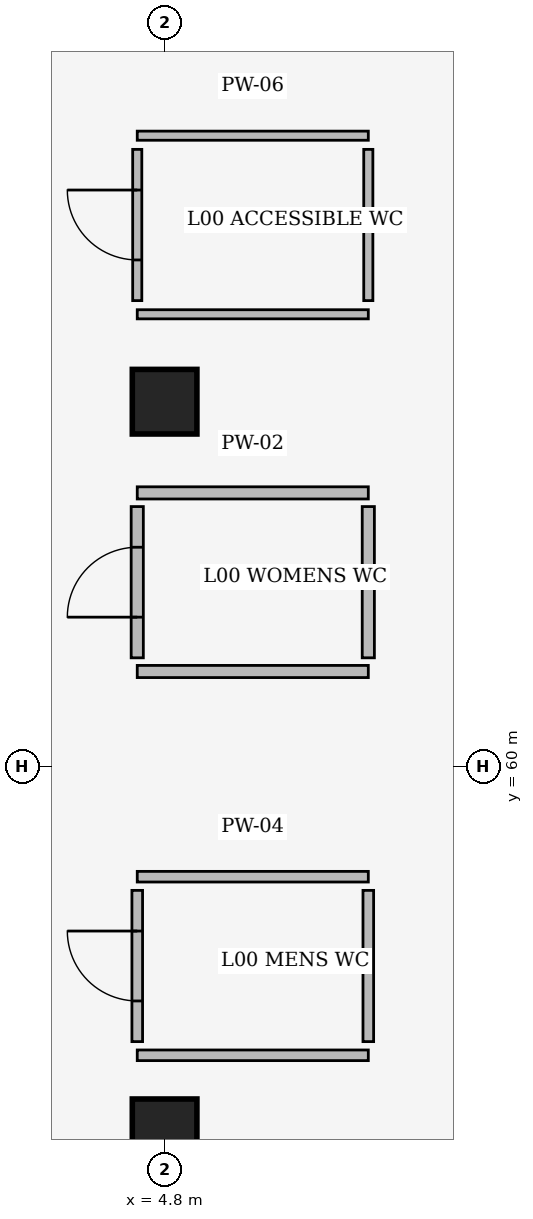
"""IFC4 building model, lengths in metres.
Left out: names, types, materials, properties, quantities, classifications, styles, units other than length and angle.
Written with IfcOpenShell. Run it as: python <this file> out.ifc"""

import sys

from ifc_helpers import new_model, si_unit, direction, frame, frame_2d, origin, origin_2d, place, context, subcontext, project, spatial, rectangle, extrude, element, fill, save


model = new_model("IFC4")
c1 = context("Model", 3, precision=1e-05, world=origin(), true_north=direction((0.0, 1.0)))
c2 = subcontext(c1, "Body", "Model", "MODEL_VIEW")
j1 = project(units=[si_unit("LENGTHUNIT", "METRE"), si_unit("PLANEANGLEUNIT", "RADIAN")], contexts=[c1])
p1 = place(None, origin())
s1 = spatial("IfcSite", under=j1, at=p1, CompositionType="ELEMENT")
p2 = place(p1, origin())
s2 = spatial("IfcBuilding", under=s1, at=p2, CompositionType="ELEMENT")
p3 = place(p2, origin())
s3 = spatial("IfcBuildingStorey", under=s2, at=p3, CompositionType="ELEMENT", Elevation=0.0)
for number, where, z_axis, x_axis in (
    (1, (4.8, 55.2, 0.0), (0.0, 0.0, 1.0), (1.0, 0.0, 0.0)),
    (2, (4.8, 64.8, 0.0), (0.0, 0.0, 1.0), (1.0, 0.0, 0.0)),
):
    element("IfcColumn", number, at=place(p3, frame(where, z_axis=z_axis, x_axis=x_axis)), inside=s3, PredefinedType="COLUMN", context=c2, shape_type="SweptSolid", body=[
        extrude(rectangle(XDim=0.85, YDim=0.85, at=origin_2d()), origin(), (0.0, 0.0, 1.0), 5.4),
    ])
for number, where, z_axis, x_axis in (
    (3, (4.44, 58.55, 0.0), (0.0, 0.0, 1.0), (1.0, 0.0, 0.0)),
    (4, (4.44, 56.2, 0.0), (0.0, 0.0, 1.0), (1.0, 0.0, 0.0)),
):
    element("IfcWall", number, at=place(p3, frame(where, z_axis=z_axis, x_axis=x_axis)), inside=s3, PredefinedType="PARTITIONING", context=c2, shape_type="SweptSolid", body=[
        extrude(rectangle(XDim=3.04, YDim=0.14, at=frame_2d((1.52, 0.0))), origin(), (0.0, 0.0, 1.0), 4.497),
    ])
p4 = place(p3, frame((4.44, 56.38, 0.0), z_axis=(0.0, 0.0, 1.0), x_axis=(0.0, 1.0, 0.0)))
e5 = element("IfcWall", 5, at=p4, inside=s3, PredefinedType="PARTITIONING", context=c2, shape_type="SweptSolid", body=[
    extrude(rectangle(XDim=1.99, YDim=0.14, at=frame_2d((0.995, 0.0))), origin(), (0.0, 0.0, 1.0), 4.497),
])
p5 = place(p4, frame((0.535, 0.0, 0.0)))
e6 = element("IfcOpeningElement", 6, at=p5, cuts=e5, PredefinedType="OPENING", context=c2, shape_type="SweptSolid", body=[
    extrude(rectangle(XDim=0.92, YDim=2.12, at=frame_2d((0.46, 1.06))), frame((0.0, 0.08, 0.0), z_axis=(0.0, -1.0, 0.0), x_axis=(1.0, 0.0, 0.0)), (0.0, 0.0, 1.0), 0.16),
])
p6 = place(p3, frame((7.48, 56.38, 0.0), z_axis=(0.0, 0.0, 1.0), x_axis=(0.0, 1.0, 0.0)))
e7 = element("IfcWall", 7, at=p6, inside=s3, PredefinedType="PARTITIONING", context=c2, shape_type="SweptSolid", body=[
    extrude(rectangle(XDim=1.99, YDim=0.14, at=frame_2d((0.995, 0.0))), origin(), (0.0, 0.0, 1.0), 5.04),
])
for number, where, z_axis, x_axis in (
    (8, (4.44, 63.6, 0.0), (0.0, 0.0, 1.0), (1.0, 0.0, 0.0)),
    (9, (4.44, 61.25, 0.0), (0.0, 0.0, 1.0), (1.0, 0.0, 0.0)),
):
    element("IfcWall", number, at=place(p3, frame(where, z_axis=z_axis, x_axis=x_axis)), inside=s3, PredefinedType="PARTITIONING", context=c2, shape_type="SweptSolid", body=[
        extrude(rectangle(XDim=3.04, YDim=0.16, at=frame_2d((1.52, 0.0))), origin(), (0.0, 0.0, 1.0), 4.497),
    ])
p7 = place(p3, frame((4.44, 61.43, 0.0), z_axis=(0.0, 0.0, 1.0), x_axis=(0.0, 1.0, 0.0)))
e10 = element("IfcWall", 10, at=p7, inside=s3, PredefinedType="PARTITIONING", context=c2, shape_type="SweptSolid", body=[
    extrude(rectangle(XDim=1.99, YDim=0.16, at=frame_2d((0.995, 0.0))), origin(), (0.0, 0.0, 1.0), 4.497),
])
p8 = place(p7, frame((0.535, 0.0, 0.0)))
e11 = element("IfcOpeningElement", 11, at=p8, cuts=e10, PredefinedType="OPENING", context=c2, shape_type="SweptSolid", body=[
    extrude(rectangle(XDim=0.92, YDim=2.12, at=frame_2d((0.46, 1.06))), frame((0.0, 0.09, 0.0), z_axis=(0.0, -1.0, 0.0), x_axis=(1.0, 0.0, 0.0)), (0.0, 0.0, 1.0), 0.18),
])
p9 = place(p3, frame((7.48, 61.43, 0.0), z_axis=(0.0, 0.0, 1.0), x_axis=(0.0, 1.0, 0.0)))
e12 = element("IfcWall", 12, at=p9, inside=s3, PredefinedType="PARTITIONING", context=c2, shape_type="SweptSolid", body=[
    extrude(rectangle(XDim=1.99, YDim=0.16, at=frame_2d((0.995, 0.0))), origin(), (0.0, 0.0, 1.0), 5.04),
])
for number, where, z_axis, x_axis in (
    (13, (4.44, 68.3, 0.0), (0.0, 0.0, 1.0), (1.0, 0.0, 0.0)),
    (14, (4.44, 65.95, 0.0), (0.0, 0.0, 1.0), (1.0, 0.0, 0.0)),
):
    element("IfcWall", number, at=place(p3, frame(where, z_axis=z_axis, x_axis=x_axis)), inside=s3, PredefinedType="PARTITIONING", context=c2, shape_type="SweptSolid", body=[
        extrude(rectangle(XDim=3.04, YDim=0.12, at=frame_2d((1.52, 0.0))), origin(), (0.0, 0.0, 1.0), 4.355),
    ])
p10 = place(p3, frame((4.44, 66.13, 0.0), z_axis=(0.0, 0.0, 1.0), x_axis=(0.0, 1.0, 0.0)))
e15 = element("IfcWall", 15, at=p10, inside=s3, PredefinedType="PARTITIONING", context=c2, shape_type="SweptSolid", body=[
    extrude(rectangle(XDim=1.99, YDim=0.12, at=frame_2d((0.995, 0.0))), origin(), (0.0, 0.0, 1.0), 4.355),
])
p11 = place(p10, frame((0.535, 0.0, 0.0)))
e16 = element("IfcOpeningElement", 16, at=p11, cuts=e15, PredefinedType="OPENING", context=c2, shape_type="SweptSolid", body=[
    extrude(rectangle(XDim=0.92, YDim=2.12, at=frame_2d((0.46, 1.06))), frame((0.0, 0.07, 0.0), z_axis=(0.0, -1.0, 0.0), x_axis=(1.0, 0.0, 0.0)), (0.0, 0.0, 1.0), 0.14),
])
p12 = place(p3, frame((7.48, 66.13, 0.0), z_axis=(0.0, 0.0, 1.0), x_axis=(0.0, 1.0, 0.0)))
e17 = element("IfcWall", 17, at=p12, inside=s3, PredefinedType="PARTITIONING", context=c2, shape_type="SweptSolid", body=[
    extrude(rectangle(XDim=1.99, YDim=0.12, at=frame_2d((0.995, 0.0))), origin(), (0.0, 0.0, 1.0), 5.04),
])
p13 = place(p5, origin())
e18 = element("IfcDoor", 18, at=p13, inside=s3, OperationType="SINGLE_SWING_RIGHT", PredefinedType="DOOR", context=c2, shape_type="SweptSolid", body=[
    extrude(rectangle(XDim=0.92, YDim=2.12, at=frame_2d((0.46, 1.06))), frame((0.0, 0.025, 0.0), z_axis=(0.0, -1.0, 0.0), x_axis=(1.0, 0.0, 0.0)), (0.0, 0.0, 1.0), 0.05),
])
fill(e6, e18)
p14 = place(p8, origin())
e19 = element("IfcDoor", 19, at=p14, inside=s3, OperationType="SINGLE_SWING_LEFT", PredefinedType="DOOR", context=c2, shape_type="SweptSolid", body=[
    extrude(rectangle(XDim=0.92, YDim=2.12, at=frame_2d((0.46, 1.06))), frame((0.0, 0.025, 0.0), z_axis=(0.0, -1.0, 0.0), x_axis=(1.0, 0.0, 0.0)), (0.0, 0.0, 1.0), 0.05),
])
fill(e11, e19)
p15 = place(p11, origin())
e20 = element("IfcDoor", 20, at=p15, inside=s3, OperationType="SINGLE_SWING_RIGHT", PredefinedType="DOOR", context=c2, shape_type="SweptSolid", body=[
    extrude(rectangle(XDim=0.92, YDim=2.12, at=frame_2d((0.46, 1.06))), frame((0.0, 0.025, 0.0), z_axis=(0.0, -1.0, 0.0), x_axis=(1.0, 0.0, 0.0)), (0.0, 0.0, 1.0), 0.05),
])
fill(e16, e20)
save(model, sys.argv[1])
